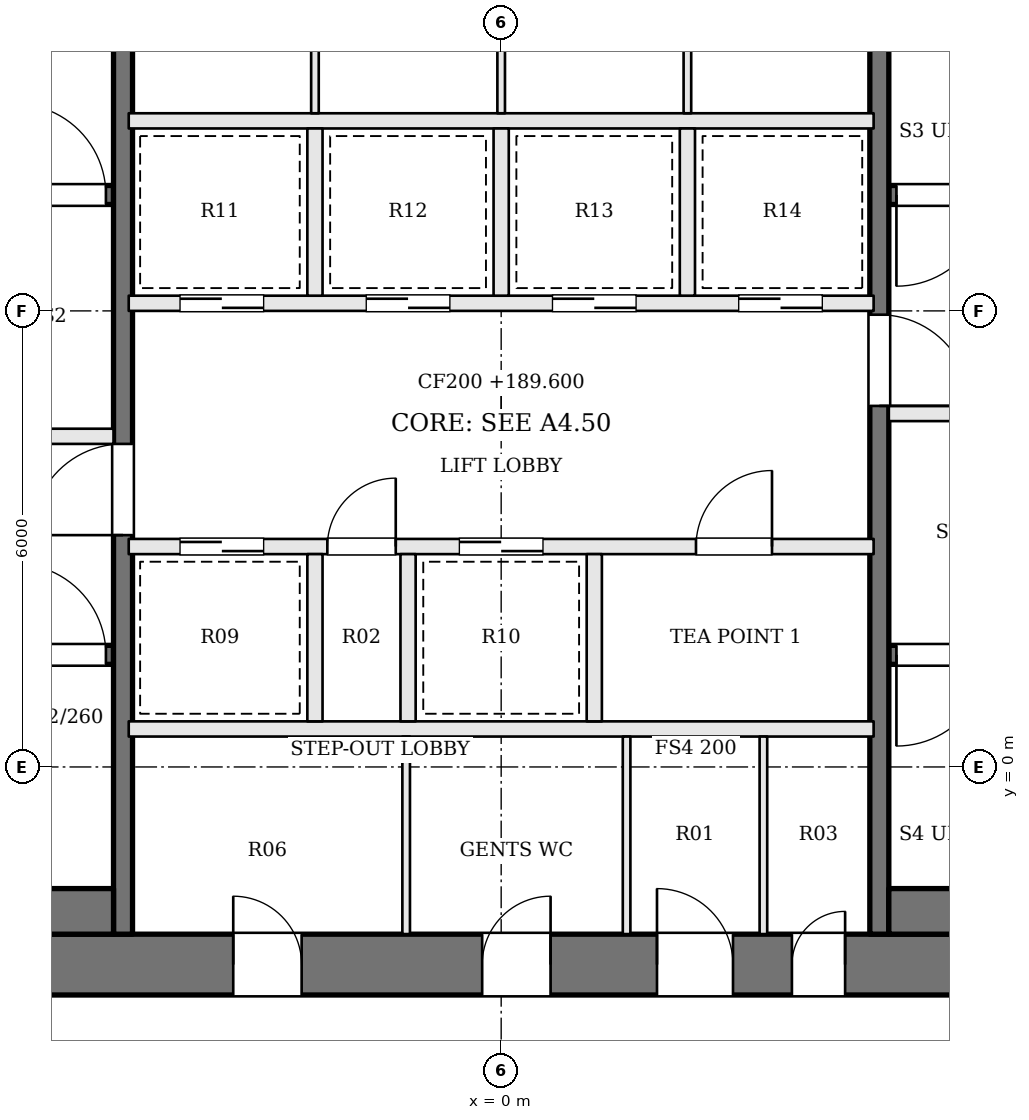
"""IFC4 building model, lengths in metres.
Left out: names, types, materials, properties, quantities, classifications, styles, units other than length and angle.
Written with IfcOpenShell. Run it as: python <this file> out.ifc"""

import sys

from ifc_helpers import new_model, si_unit, direction, frame, frame_2d, origin, place, context, subcontext, project, spatial, rectangle, extrude, element, fill, save


model = new_model("IFC4")
c1 = context("Model", 3, precision=1e-05, world=origin(), true_north=direction((0.0, 1.0)))
c2 = subcontext(c1, "Body", "Model", "MODEL_VIEW")
j1 = project(units=[si_unit("LENGTHUNIT", "METRE"), si_unit("PLANEANGLEUNIT", "RADIAN")], contexts=[c1])
p1 = place(None, origin())
s1 = spatial("IfcSite", under=j1, at=p1, CompositionType="ELEMENT")
p2 = place(p1, origin())
s2 = spatial("IfcBuilding", under=s1, at=p2, CompositionType="ELEMENT")
p3 = place(p2, frame((0.0, 0.0, 189.6)))
s3 = spatial("IfcBuildingStorey", under=s2, at=p3, CompositionType="ELEMENT", Elevation=189.6)
p4 = place(p3, frame((-13.0, -2.6, 0.0), z_axis=(0.0, 0.0, 1.0), x_axis=(1.0, 0.0, 0.0)))
e1 = element("IfcWall", 1, at=p4, inside=s3, PredefinedType="SHEAR", context=c2, shape_type="SweptSolid", body=[
    extrude(rectangle(XDim=26.0, YDim=0.8, at=frame_2d((13.0, 0.0))), origin(), (0.0, 0.0, 1.0), 3.9),
])
p5 = place(p4, frame((9.475, 0.0, 0.0)))
e2 = element("IfcOpeningElement", 2, at=p5, cuts=e1, PredefinedType="OPENING", context=c2, shape_type="SweptSolid", body=[
    extrude(rectangle(XDim=0.9, YDim=2.1, at=frame_2d((0.45, 1.05))), frame((0.0, 0.41, 0.0), z_axis=(0.0, -1.0, 0.0), x_axis=(1.0, 0.0, 0.0)), (0.0, 0.0, 1.0), 0.82),
])
p6 = place(p4, frame((12.75, 0.0, 0.0)))
e3 = element("IfcOpeningElement", 3, at=p6, cuts=e1, PredefinedType="OPENING", context=c2, shape_type="SweptSolid", body=[
    extrude(rectangle(XDim=0.9, YDim=2.1, at=frame_2d((0.45, 1.05))), frame((0.0, 0.41, 0.0), z_axis=(0.0, -1.0, 0.0), x_axis=(1.0, 0.0, 0.0)), (0.0, 0.0, 1.0), 0.82),
])
p7 = place(p4, frame((15.05, 0.0, 0.0)))
e4 = element("IfcOpeningElement", 4, at=p7, cuts=e1, PredefinedType="OPENING", context=c2, shape_type="SweptSolid", body=[
    extrude(rectangle(XDim=1.0, YDim=2.1, at=frame_2d((0.5, 1.05))), frame((0.0, 0.41, 0.0), z_axis=(0.0, -1.0, 0.0), x_axis=(1.0, 0.0, 0.0)), (0.0, 0.0, 1.0), 0.82),
])
p8 = place(p4, frame((16.825, 0.0, 0.0)))
e5 = element("IfcOpeningElement", 5, at=p8, cuts=e1, PredefinedType="OPENING", context=c2, shape_type="SweptSolid", body=[
    extrude(rectangle(XDim=0.7, YDim=2.1, at=frame_2d((0.35, 1.05))), frame((0.0, 0.41, 0.0), z_axis=(0.0, -1.0, 0.0), x_axis=(1.0, 0.0, 0.0)), (0.0, 0.0, 1.0), 0.82),
])
p9 = place(p3, frame((-12.2, 1.475, 0.0), z_axis=(0.0, 0.0, 1.0), x_axis=(1.0, 0.0, 0.0)))
e6 = element("IfcWall", 6, at=p9, inside=s3, PredefinedType="SOLIDWALL", context=c2, shape_type="SweptSolid", body=[
    extrude(rectangle(XDim=7.1, YDim=0.25, at=frame_2d((3.55, 0.0))), origin(), (0.0, 0.0, 1.0), 3.7),
])
p10 = place(p9, frame((5.8, 0.0, 0.0)))
e7 = element("IfcOpeningElement", 7, at=p10, cuts=e6, PredefinedType="OPENING", context=c2, shape_type="SweptSolid", body=[
    extrude(rectangle(XDim=1.2, YDim=2.1, at=frame_2d((0.6, 1.05))), frame((0.0, 0.135, 0.0), z_axis=(0.0, -1.0, 0.0), x_axis=(1.0, 0.0, 0.0)), (0.0, 0.0, 1.0), 0.27),
])
p11 = place(p3, frame((12.2, 7.525, 0.0), z_axis=(0.0, 0.0, 1.0), x_axis=(-1.0, 0.0, 0.0)))
e8 = element("IfcWall", 8, at=p11, inside=s3, PredefinedType="SOLIDWALL", context=c2, shape_type="SweptSolid", body=[
    extrude(rectangle(XDim=7.1, YDim=0.25, at=frame_2d((3.55, 0.0))), origin(), (0.0, 0.0, 1.0), 3.7),
])
p12 = place(p11, frame((5.8, 0.0, 0.0)))
e9 = element("IfcOpeningElement", 9, at=p12, cuts=e8, PredefinedType="OPENING", context=c2, shape_type="SweptSolid", body=[
    extrude(rectangle(XDim=1.2, YDim=2.1, at=frame_2d((0.6, 1.05))), frame((0.0, 0.135, 0.0), z_axis=(0.0, -1.0, 0.0), x_axis=(1.0, 0.0, 0.0)), (0.0, 0.0, 1.0), 0.27),
])
p13 = place(p3, frame((-12.2, 4.35, 0.0), z_axis=(0.0, 0.0, 1.0), x_axis=(1.0, 0.0, 0.0)))
e10 = element("IfcWall", 10, at=p13, inside=s3, PredefinedType="SOLIDWALL", context=c2, shape_type="SweptSolid", body=[
    extrude(rectangle(XDim=7.1, YDim=0.2, at=frame_2d((3.55, 0.0))), origin(), (0.0, 0.0, 1.0), 3.7),
])
p14 = place(p13, frame((4.4, 0.0, 0.0)))
e11 = element("IfcOpeningElement", 11, at=p14, cuts=e10, PredefinedType="OPENING", context=c2, shape_type="SweptSolid", body=[
    extrude(rectangle(XDim=1.2, YDim=2.1, at=frame_2d((0.6, 1.05))), frame((0.0, 0.11, 0.0), z_axis=(0.0, -1.0, 0.0), x_axis=(1.0, 0.0, 0.0)), (0.0, 0.0, 1.0), 0.22),
])
p15 = place(p13, frame((1.1, 0.0, 0.0)))
e12 = element("IfcOpeningElement", 12, at=p15, cuts=e10, PredefinedType="OPENING", context=c2, shape_type="SweptSolid", body=[
    extrude(rectangle(XDim=1.2, YDim=2.1, at=frame_2d((0.6, 1.05))), frame((0.0, 0.11, 0.0), z_axis=(0.0, -1.0, 0.0), x_axis=(1.0, 0.0, 0.0)), (0.0, 0.0, 1.0), 0.22),
])
p16 = place(p3, frame((12.2, 4.65, 0.0), z_axis=(0.0, 0.0, 1.0), x_axis=(-1.0, 0.0, 0.0)))
e13 = element("IfcWall", 13, at=p16, inside=s3, PredefinedType="SOLIDWALL", context=c2, shape_type="SweptSolid", body=[
    extrude(rectangle(XDim=7.1, YDim=0.2, at=frame_2d((3.55, 0.0))), origin(), (0.0, 0.0, 1.0), 3.7),
])
p17 = place(p16, frame((4.4, 0.0, 0.0)))
e14 = element("IfcOpeningElement", 14, at=p17, cuts=e13, PredefinedType="OPENING", context=c2, shape_type="SweptSolid", body=[
    extrude(rectangle(XDim=1.2, YDim=2.1, at=frame_2d((0.6, 1.05))), frame((0.0, 0.11, 0.0), z_axis=(0.0, -1.0, 0.0), x_axis=(1.0, 0.0, 0.0)), (0.0, 0.0, 1.0), 0.22),
])
p18 = place(p16, frame((1.1, 0.0, 0.0)))
e15 = element("IfcOpeningElement", 15, at=p18, cuts=e13, PredefinedType="OPENING", context=c2, shape_type="SweptSolid", body=[
    extrude(rectangle(XDim=1.2, YDim=2.1, at=frame_2d((0.6, 1.05))), frame((0.0, 0.11, 0.0), z_axis=(0.0, -1.0, 0.0), x_axis=(1.0, 0.0, 0.0)), (0.0, 0.0, 1.0), 0.22),
])
p19 = place(p3, frame((-12.2, 7.525, 0.0), z_axis=(0.0, 0.0, 1.0), x_axis=(1.0, 0.0, 0.0)))
e16 = element("IfcWall", 16, at=p19, inside=s3, PredefinedType="SOLIDWALL", context=c2, shape_type="SweptSolid", body=[
    extrude(rectangle(XDim=7.1, YDim=0.25, at=frame_2d((3.55, 0.0))), origin(), (0.0, 0.0, 1.0), 3.7),
])
p20 = place(p19, frame((5.8, 0.0, 0.0)))
e17 = element("IfcOpeningElement", 17, at=p20, cuts=e16, PredefinedType="OPENING", context=c2, shape_type="SweptSolid", body=[
    extrude(rectangle(XDim=1.2, YDim=2.1, at=frame_2d((0.6, 1.05))), frame((0.0, 0.135, 0.0), z_axis=(0.0, -1.0, 0.0), x_axis=(1.0, 0.0, 0.0)), (0.0, 0.0, 1.0), 0.27),
])
p21 = place(p3, frame((12.2, 1.475, 0.0), z_axis=(0.0, 0.0, 1.0), x_axis=(-1.0, 0.0, 0.0)))
e18 = element("IfcWall", 18, at=p21, inside=s3, PredefinedType="SOLIDWALL", context=c2, shape_type="SweptSolid", body=[
    extrude(rectangle(XDim=7.1, YDim=0.25, at=frame_2d((3.55, 0.0))), origin(), (0.0, 0.0, 1.0), 3.7),
])
p22 = place(p21, frame((5.8, 0.0, 0.0)))
e19 = element("IfcOpeningElement", 19, at=p22, cuts=e18, PredefinedType="OPENING", context=c2, shape_type="SweptSolid", body=[
    extrude(rectangle(XDim=1.2, YDim=2.1, at=frame_2d((0.6, 1.05))), frame((0.0, 0.135, 0.0), z_axis=(0.0, -1.0, 0.0), x_axis=(1.0, 0.0, 0.0)), (0.0, 0.0, 1.0), 0.27),
])
p23 = place(p3, frame((-4.975, -2.2, 0.0), z_axis=(0.0, 0.0, 1.0), x_axis=(0.0, 1.0, 0.0)))
e20 = element("IfcWall", 20, at=p23, inside=s3, PredefinedType="SOLIDWALL", context=c2, shape_type="SweptSolid", body=[
    extrude(rectangle(XDim=13.4, YDim=0.25, at=frame_2d((6.7, 0.0))), origin(), (0.0, 0.0, 1.0), 3.7),
])
p24 = place(p23, frame((5.25, 0.0, 0.0)))
e21 = element("IfcOpeningElement", 21, at=p24, cuts=e20, PredefinedType="OPENING", context=c2, shape_type="SweptSolid", body=[
    extrude(rectangle(XDim=1.2, YDim=2.1, at=frame_2d((0.6, 1.05))), frame((0.0, 0.135, 0.0), z_axis=(0.0, -1.0, 0.0), x_axis=(1.0, 0.0, 0.0)), (0.0, 0.0, 1.0), 0.27),
])
p25 = place(p3, frame((4.975, 11.2, 0.0), z_axis=(0.0, 0.0, 1.0), x_axis=(0.0, -1.0, 0.0)))
e22 = element("IfcWall", 22, at=p25, inside=s3, PredefinedType="SOLIDWALL", context=c2, shape_type="SweptSolid", body=[
    extrude(rectangle(XDim=13.4, YDim=0.25, at=frame_2d((6.7, 0.0))), origin(), (0.0, 0.0, 1.0), 3.7),
])
p26 = place(p25, frame((5.25, 0.0, 0.0)))
e23 = element("IfcOpeningElement", 23, at=p26, cuts=e22, PredefinedType="OPENING", context=c2, shape_type="SweptSolid", body=[
    extrude(rectangle(XDim=1.2, YDim=2.1, at=frame_2d((0.6, 1.05))), frame((0.0, 0.135, 0.0), z_axis=(0.0, -1.0, 0.0), x_axis=(1.0, 0.0, 0.0)), (0.0, 0.0, 1.0), 0.27),
])
for number, where, z_axis, x_axis in (
    (24, (-12.2, -1.9, 0.0), (0.0, 0.0, 1.0), (1.0, 0.0, 0.0)),
    (25, (12.2, -1.9, 0.0), (0.0, 0.0, 1.0), (-1.0, 0.0, 0.0)),
):
    element("IfcWall", number, at=place(p3, frame(where, z_axis=z_axis, x_axis=x_axis)), inside=s3, PredefinedType="SOLIDWALL", context=c2, shape_type="SweptSolid", body=[
        extrude(rectangle(XDim=7.1, YDim=0.6, at=frame_2d((3.55, 0.0))), origin(), (0.0, 0.0, 1.0), 3.7),
    ])
p27 = place(p3, frame((-4.9, 0.5, 0.0), z_axis=(0.0, 0.0, 1.0), x_axis=(1.0, 0.0, 0.0)))
e26 = element("IfcWall", 26, at=p27, inside=s3, PredefinedType="SOLIDWALL", context=c2, shape_type="SweptSolid", body=[
    extrude(rectangle(XDim=9.8, YDim=0.2, at=frame_2d((4.9, 0.0))), origin(), (0.0, 0.0, 1.0), 3.7),
])
p28 = place(p3, frame((-4.9, 2.9, 0.0), z_axis=(0.0, 0.0, 1.0), x_axis=(1.0, 0.0, 0.0)))
e27 = element("IfcWall", 27, at=p28, inside=s3, PredefinedType="SOLIDWALL", context=c2, shape_type="SweptSolid", body=[
    extrude(rectangle(XDim=9.8, YDim=0.2, at=frame_2d((4.9, 0.0))), origin(), (0.0, 0.0, 1.0), 3.7),
])
p29 = place(p28, frame((0.675, 0.0, 0.0)))
e28 = element("IfcOpeningElement", 28, at=p29, cuts=e27, PredefinedType="OPENING", context=c2, shape_type="SweptSolid", body=[
    extrude(rectangle(XDim=1.1, YDim=2.1, at=frame_2d((0.55, 1.05))), frame((0.0, 0.11, 0.0), z_axis=(0.0, -1.0, 0.0), x_axis=(1.0, 0.0, 0.0)), (0.0, 0.0, 1.0), 0.22),
])
p30 = place(p28, frame((2.613, 0.0, 0.0)))
e29 = element("IfcOpeningElement", 29, at=p30, cuts=e27, PredefinedType="OPENING", context=c2, shape_type="SweptSolid", body=[
    extrude(rectangle(XDim=0.9, YDim=2.1, at=frame_2d((0.45, 1.05))), frame((0.0, 0.11, 0.0), z_axis=(0.0, -1.0, 0.0), x_axis=(1.0, 0.0, 0.0)), (0.0, 0.0, 1.0), 0.22),
])
p31 = place(p28, frame((4.35, 0.0, 0.0)))
e30 = element("IfcOpeningElement", 30, at=p31, cuts=e27, PredefinedType="OPENING", context=c2, shape_type="SweptSolid", body=[
    extrude(rectangle(XDim=1.1, YDim=2.1, at=frame_2d((0.55, 1.05))), frame((0.0, 0.11, 0.0), z_axis=(0.0, -1.0, 0.0), x_axis=(1.0, 0.0, 0.0)), (0.0, 0.0, 1.0), 0.22),
])
p32 = place(p28, frame((7.463, 0.0, 0.0)))
e31 = element("IfcOpeningElement", 31, at=p32, cuts=e27, PredefinedType="OPENING", context=c2, shape_type="SweptSolid", body=[
    extrude(rectangle(XDim=1.0, YDim=2.1, at=frame_2d((0.5, 1.05))), frame((0.0, 0.11, 0.0), z_axis=(0.0, -1.0, 0.0), x_axis=(1.0, 0.0, 0.0)), (0.0, 0.0, 1.0), 0.22),
])
p33 = place(p3, frame((-4.9, 6.1, 0.0), z_axis=(0.0, 0.0, 1.0), x_axis=(1.0, 0.0, 0.0)))
e32 = element("IfcWall", 32, at=p33, inside=s3, PredefinedType="SOLIDWALL", context=c2, shape_type="SweptSolid", body=[
    extrude(rectangle(XDim=9.8, YDim=0.2, at=frame_2d((4.9, 0.0))), origin(), (0.0, 0.0, 1.0), 3.7),
])
p34 = place(p33, frame((0.675, 0.0, 0.0)))
e33 = element("IfcOpeningElement", 33, at=p34, cuts=e32, PredefinedType="OPENING", context=c2, shape_type="SweptSolid", body=[
    extrude(rectangle(XDim=1.1, YDim=2.1, at=frame_2d((0.55, 1.05))), frame((0.0, 0.11, 0.0), z_axis=(0.0, -1.0, 0.0), x_axis=(1.0, 0.0, 0.0)), (0.0, 0.0, 1.0), 0.22),
])
p35 = place(p33, frame((3.125, 0.0, 0.0)))
e34 = element("IfcOpeningElement", 34, at=p35, cuts=e32, PredefinedType="OPENING", context=c2, shape_type="SweptSolid", body=[
    extrude(rectangle(XDim=1.1, YDim=2.1, at=frame_2d((0.55, 1.05))), frame((0.0, 0.11, 0.0), z_axis=(0.0, -1.0, 0.0), x_axis=(1.0, 0.0, 0.0)), (0.0, 0.0, 1.0), 0.22),
])
p36 = place(p33, frame((5.575, 0.0, 0.0)))
e35 = element("IfcOpeningElement", 35, at=p36, cuts=e32, PredefinedType="OPENING", context=c2, shape_type="SweptSolid", body=[
    extrude(rectangle(XDim=1.1, YDim=2.1, at=frame_2d((0.55, 1.05))), frame((0.0, 0.11, 0.0), z_axis=(0.0, -1.0, 0.0), x_axis=(1.0, 0.0, 0.0)), (0.0, 0.0, 1.0), 0.22),
])
p37 = place(p33, frame((8.025, 0.0, 0.0)))
e36 = element("IfcOpeningElement", 36, at=p37, cuts=e32, PredefinedType="OPENING", context=c2, shape_type="SweptSolid", body=[
    extrude(rectangle(XDim=1.1, YDim=2.1, at=frame_2d((0.55, 1.05))), frame((0.0, 0.11, 0.0), z_axis=(0.0, -1.0, 0.0), x_axis=(1.0, 0.0, 0.0)), (0.0, 0.0, 1.0), 0.22),
])
p38 = place(p3, frame((-4.9, 8.5, 0.0), z_axis=(0.0, 0.0, 1.0), x_axis=(1.0, 0.0, 0.0)))
e37 = element("IfcWall", 37, at=p38, inside=s3, PredefinedType="SOLIDWALL", context=c2, shape_type="SweptSolid", body=[
    extrude(rectangle(XDim=9.8, YDim=0.2, at=frame_2d((4.9, 0.0))), origin(), (0.0, 0.0, 1.0), 3.7),
])
for number, where, z_axis, x_axis in (
    (38, (-2.45, 0.6, 0.0), (0.0, 0.0, 1.0), (0.0, 1.0, 0.0)),
    (39, (-1.225, 0.6, 0.0), (0.0, 0.0, 1.0), (0.0, 1.0, 0.0)),
    (40, (1.225, 0.6, 0.0), (0.0, 0.0, 1.0), (0.0, 1.0, 0.0)),
    (41, (-2.45, 6.2, 0.0), (0.0, 0.0, 1.0), (0.0, 1.0, 0.0)),
    (42, (0.0, 6.2, 0.0), (0.0, 0.0, 1.0), (0.0, 1.0, 0.0)),
    (43, (2.45, 6.2, 0.0), (0.0, 0.0, 1.0), (0.0, 1.0, 0.0)),
):
    element("IfcWall", number, at=place(p3, frame(where, z_axis=z_axis, x_axis=x_axis)), inside=s3, PredefinedType="SOLIDWALL", context=c2, shape_type="SweptSolid", body=[
        extrude(rectangle(XDim=2.2, YDim=0.2, at=frame_2d((1.1, 0.0))), origin(), (0.0, 0.0, 1.0), 3.7),
    ])
for number, where, z_axis, x_axis in (
    (44, (-1.25, -2.2, 0.0), (0.0, 0.0, 1.0), (0.0, 1.0, 0.0)),
    (45, (1.65, -2.2, 0.0), (0.0, 0.0, 1.0), (0.0, 1.0, 0.0)),
    (46, (3.45, -2.2, 0.0), (0.0, 0.0, 1.0), (0.0, 1.0, 0.0)),
    (47, (-2.45, 8.6, 0.0), (0.0, 0.0, 1.0), (0.0, 1.0, 0.0)),
    (48, (0.0, 8.6, 0.0), (0.0, 0.0, 1.0), (0.0, 1.0, 0.0)),
    (49, (2.45, 8.6, 0.0), (0.0, 0.0, 1.0), (0.0, 1.0, 0.0)),
):
    element("IfcWall", number, at=place(p3, frame(where, z_axis=z_axis, x_axis=x_axis)), inside=s3, PredefinedType="PARTITIONING", context=c2, shape_type="SweptSolid", body=[
        extrude(rectangle(XDim=2.6, YDim=0.1, at=frame_2d((1.3, 0.0))), origin(), (0.0, 0.0, 1.0), 3.7),
    ])
p39 = place(p24, origin())
e50 = element("IfcDoor", 50, at=p39, inside=s3, OperationType="SINGLE_SWING_LEFT", PredefinedType="DOOR", context=c2, shape_type="SweptSolid", body=[
    extrude(rectangle(XDim=1.2, YDim=2.1, at=frame_2d((0.6, 1.05))), frame((0.0, 0.025, 0.0), z_axis=(0.0, -1.0, 0.0), x_axis=(1.0, 0.0, 0.0)), (0.0, 0.0, 1.0), 0.05),
])
fill(e21, e50)
p40 = place(p26, origin())
e51 = element("IfcDoor", 51, at=p40, inside=s3, OperationType="SINGLE_SWING_RIGHT", PredefinedType="DOOR", context=c2, shape_type="SweptSolid", body=[
    extrude(rectangle(XDim=1.2, YDim=2.1, at=frame_2d((0.6, 1.05))), frame((0.0, 0.025, 0.0), z_axis=(0.0, -1.0, 0.0), x_axis=(1.0, 0.0, 0.0)), (0.0, 0.0, 1.0), 0.05),
])
fill(e23, e51)
p41 = place(p10, origin())
e52 = element("IfcDoor", 52, at=p41, inside=s3, OperationType="SINGLE_SWING_LEFT", PredefinedType="DOOR", context=c2, shape_type="SweptSolid", body=[
    extrude(rectangle(XDim=1.2, YDim=2.1, at=frame_2d((0.6, 1.05))), frame((0.0, 0.025, 0.0), z_axis=(0.0, -1.0, 0.0), x_axis=(1.0, 0.0, 0.0)), (0.0, 0.0, 1.0), 0.05),
])
fill(e7, e52)
p42 = place(p12, origin())
e53 = element("IfcDoor", 53, at=p42, inside=s3, OperationType="SINGLE_SWING_RIGHT", PredefinedType="DOOR", context=c2, shape_type="SweptSolid", body=[
    extrude(rectangle(XDim=1.2, YDim=2.1, at=frame_2d((0.6, 1.05))), frame((0.0, 0.025, 0.0), z_axis=(0.0, -1.0, 0.0), x_axis=(1.0, 0.0, 0.0)), (0.0, 0.0, 1.0), 0.05),
])
fill(e9, e53)
p43 = place(p20, origin())
e54 = element("IfcDoor", 54, at=p43, inside=s3, OperationType="SINGLE_SWING_LEFT", PredefinedType="DOOR", context=c2, shape_type="SweptSolid", body=[
    extrude(rectangle(XDim=1.2, YDim=2.1, at=frame_2d((0.6, 1.05))), frame((0.0, 0.025, 0.0), z_axis=(0.0, -1.0, 0.0), x_axis=(1.0, 0.0, 0.0)), (0.0, 0.0, 1.0), 0.05),
])
fill(e17, e54)
p44 = place(p22, origin())
e55 = element("IfcDoor", 55, at=p44, inside=s3, OperationType="SINGLE_SWING_RIGHT", PredefinedType="DOOR", context=c2, shape_type="SweptSolid", body=[
    extrude(rectangle(XDim=1.2, YDim=2.1, at=frame_2d((0.6, 1.05))), frame((0.0, 0.025, 0.0), z_axis=(0.0, -1.0, 0.0), x_axis=(1.0, 0.0, 0.0)), (0.0, 0.0, 1.0), 0.05),
])
fill(e19, e55)
p45 = place(p29, origin())
e56 = element("IfcDoor", 56, at=p45, inside=s3, OperationType="SLIDING_TO_RIGHT", PredefinedType="DOOR", context=c2, shape_type="SweptSolid", body=[
    extrude(rectangle(XDim=1.1, YDim=2.1, at=frame_2d((0.55, 1.05))), frame((0.0, 0.025, 0.0), z_axis=(0.0, -1.0, 0.0), x_axis=(1.0, 0.0, 0.0)), (0.0, 0.0, 1.0), 0.05),
])
fill(e28, e56)
p46 = place(p30, origin())
e57 = element("IfcDoor", 57, at=p46, inside=s3, OperationType="SINGLE_SWING_RIGHT", PredefinedType="DOOR", context=c2, shape_type="SweptSolid", body=[
    extrude(rectangle(XDim=0.9, YDim=2.1, at=frame_2d((0.45, 1.05))), frame((0.0, 0.025, 0.0), z_axis=(0.0, -1.0, 0.0), x_axis=(1.0, 0.0, 0.0)), (0.0, 0.0, 1.0), 0.05),
])
fill(e29, e57)
p47 = place(p31, origin())
e58 = element("IfcDoor", 58, at=p47, inside=s3, OperationType="SLIDING_TO_LEFT", PredefinedType="DOOR", context=c2, shape_type="SweptSolid", body=[
    extrude(rectangle(XDim=1.1, YDim=2.1, at=frame_2d((0.55, 1.05))), frame((0.0, 0.025, 0.0), z_axis=(0.0, -1.0, 0.0), x_axis=(1.0, 0.0, 0.0)), (0.0, 0.0, 1.0), 0.05),
])
fill(e30, e58)
p48 = place(p32, origin())
e59 = element("IfcDoor", 59, at=p48, inside=s3, OperationType="SINGLE_SWING_RIGHT", PredefinedType="DOOR", context=c2, shape_type="SweptSolid", body=[
    extrude(rectangle(XDim=1.0, YDim=2.1, at=frame_2d((0.5, 1.05))), frame((0.0, 0.025, 0.0), z_axis=(0.0, -1.0, 0.0), x_axis=(1.0, 0.0, 0.0)), (0.0, 0.0, 1.0), 0.05),
])
fill(e31, e59)
p49 = place(p34, origin())
e60 = element("IfcDoor", 60, at=p49, inside=s3, OperationType="SLIDING_TO_RIGHT", PredefinedType="DOOR", context=c2, shape_type="SweptSolid", body=[
    extrude(rectangle(XDim=1.1, YDim=2.1, at=frame_2d((0.55, 1.05))), frame((0.0, 0.025, 0.0), z_axis=(0.0, -1.0, 0.0), x_axis=(1.0, 0.0, 0.0)), (0.0, 0.0, 1.0), 0.05),
])
fill(e33, e60)
p50 = place(p35, origin())
e61 = element("IfcDoor", 61, at=p50, inside=s3, OperationType="SLIDING_TO_LEFT", PredefinedType="DOOR", context=c2, shape_type="SweptSolid", body=[
    extrude(rectangle(XDim=1.1, YDim=2.1, at=frame_2d((0.55, 1.05))), frame((0.0, 0.025, 0.0), z_axis=(0.0, -1.0, 0.0), x_axis=(1.0, 0.0, 0.0)), (0.0, 0.0, 1.0), 0.05),
])
fill(e34, e61)
p51 = place(p36, origin())
e62 = element("IfcDoor", 62, at=p51, inside=s3, OperationType="SLIDING_TO_RIGHT", PredefinedType="DOOR", context=c2, shape_type="SweptSolid", body=[
    extrude(rectangle(XDim=1.1, YDim=2.1, at=frame_2d((0.55, 1.05))), frame((0.0, 0.025, 0.0), z_axis=(0.0, -1.0, 0.0), x_axis=(1.0, 0.0, 0.0)), (0.0, 0.0, 1.0), 0.05),
])
fill(e35, e62)
p52 = place(p37, origin())
e63 = element("IfcDoor", 63, at=p52, inside=s3, OperationType="SLIDING_TO_LEFT", PredefinedType="DOOR", context=c2, shape_type="SweptSolid", body=[
    extrude(rectangle(XDim=1.1, YDim=2.1, at=frame_2d((0.55, 1.05))), frame((0.0, 0.025, 0.0), z_axis=(0.0, -1.0, 0.0), x_axis=(1.0, 0.0, 0.0)), (0.0, 0.0, 1.0), 0.05),
])
fill(e36, e63)
p53 = place(p5, origin())
e64 = element("IfcDoor", 64, at=p53, inside=s3, OperationType="SINGLE_SWING_LEFT", PredefinedType="DOOR", context=c2, shape_type="SweptSolid", body=[
    extrude(rectangle(XDim=0.9, YDim=2.1, at=frame_2d((0.45, 1.05))), frame((0.0, 0.025, 0.0), z_axis=(0.0, -1.0, 0.0), x_axis=(1.0, 0.0, 0.0)), (0.0, 0.0, 1.0), 0.05),
])
fill(e2, e64)
p54 = place(p6, origin())
e65 = element("IfcDoor", 65, at=p54, inside=s3, OperationType="SINGLE_SWING_RIGHT", PredefinedType="DOOR", context=c2, shape_type="SweptSolid", body=[
    extrude(rectangle(XDim=0.9, YDim=2.1, at=frame_2d((0.45, 1.05))), frame((0.0, 0.025, 0.0), z_axis=(0.0, -1.0, 0.0), x_axis=(1.0, 0.0, 0.0)), (0.0, 0.0, 1.0), 0.05),
])
fill(e3, e65)
p55 = place(p7, origin())
e66 = element("IfcDoor", 66, at=p55, inside=s3, OperationType="SINGLE_SWING_LEFT", PredefinedType="DOOR", context=c2, shape_type="SweptSolid", body=[
    extrude(rectangle(XDim=1.0, YDim=2.1, at=frame_2d((0.5, 1.05))), frame((0.0, 0.025, 0.0), z_axis=(0.0, -1.0, 0.0), x_axis=(1.0, 0.0, 0.0)), (0.0, 0.0, 1.0), 0.05),
])
fill(e4, e66)
p56 = place(p8, origin())
e67 = element("IfcDoor", 67, at=p56, inside=s3, OperationType="SINGLE_SWING_RIGHT", PredefinedType="DOOR", context=c2, shape_type="SweptSolid", body=[
    extrude(rectangle(XDim=0.7, YDim=2.1, at=frame_2d((0.35, 1.05))), frame((0.0, 0.025, 0.0), z_axis=(0.0, -1.0, 0.0), x_axis=(1.0, 0.0, 0.0)), (0.0, 0.0, 1.0), 0.05),
])
fill(e5, e67)
save(model, sys.argv[1])
